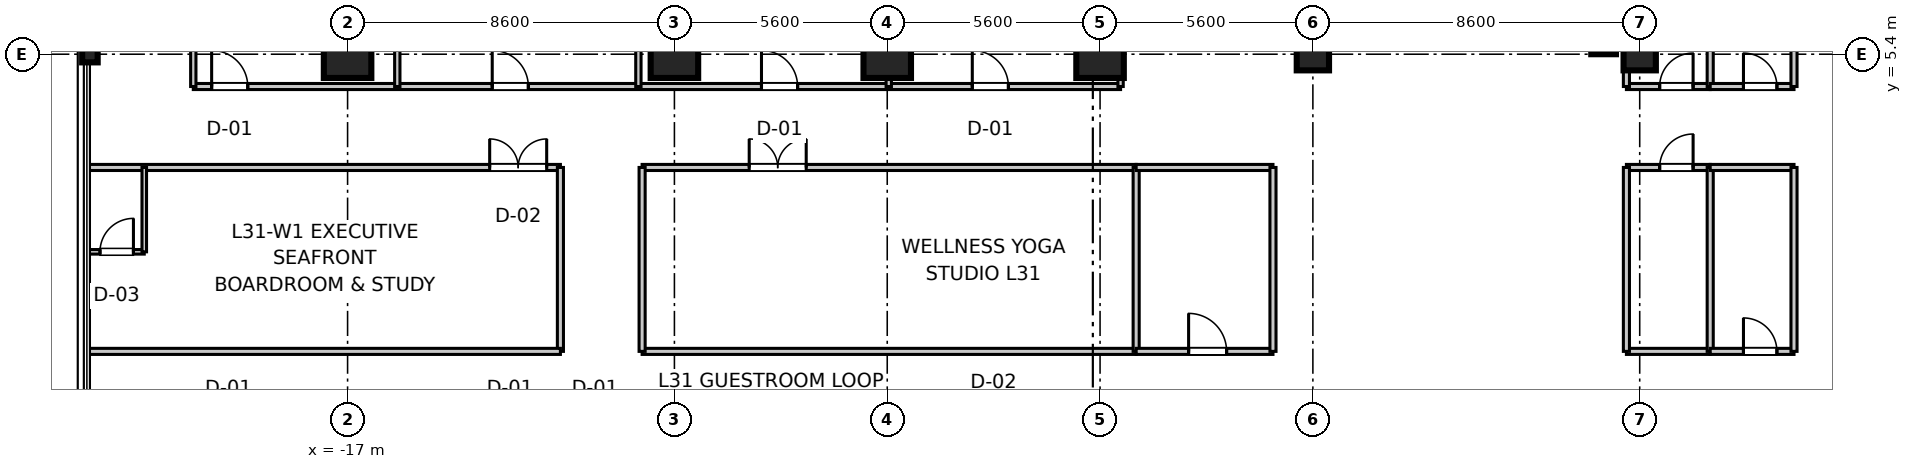
"""IFC4 building model, lengths in metres.
Left out: names, types, materials, properties, quantities, classifications, styles, units other than length and angle.
Written with IfcOpenShell. Run it as: python <this file> out.ifc"""

import sys

from ifc_helpers import new_model, si_unit, direction, frame, frame_2d, origin, origin_2d, place, context, subcontext, project, spatial, rectangle, i_section, extrude, source, transform, mapped, element, fill, save


model = new_model("IFC4")
c1 = context("Model", 3, precision=1e-05, world=origin(), true_north=direction((0.0, 1.0)))
c2 = subcontext(c1, "Body", "Model", "MODEL_VIEW")
j1 = project(units=[si_unit("LENGTHUNIT", "METRE"), si_unit("PLANEANGLEUNIT", "RADIAN")], contexts=[c1])
p1 = place(None, origin())
s1 = spatial("IfcSite", under=j1, at=p1, CompositionType="ELEMENT")
p2 = place(p1, origin())
s2 = spatial("IfcBuilding", under=s1, at=p2, CompositionType="ELEMENT")
p3 = place(p2, frame((0.0, 0.0, 124.8)))
s3 = spatial("IfcBuildingStorey", under=s2, at=p3, CompositionType="ELEMENT", Elevation=124.8)
m1 = source(origin(), c2, "Body", "SweptSolid", [
    extrude(rectangle(XDim=1.25, YDim=1.25, at=origin_2d()), origin(), (0.0, 0.0, 1.0), 3.605),
])
for number, where, z_axis, x_axis in (
    (1, (-17.0, 5.4, 0.0), (0.0, 0.0, 1.0), (1.0, 0.0, 0.0)),
    (2, (-8.4, 5.4, 0.0), (0.0, 0.0, 1.0), (1.0, 0.0, 0.0)),
    (3, (-2.8, 5.4, 0.0), (0.0, 0.0, 1.0), (1.0, 0.0, 0.0)),
    (4, (2.8, 5.4, 0.0), (0.0, 0.0, 1.0), (1.0, 0.0, 0.0)),
):
    element("IfcColumn", number, at=place(p3, frame(where, z_axis=z_axis, x_axis=x_axis)), inside=s3, PredefinedType="COLUMN", context=c2, shape_type="MappedRepresentation", body=[
        mapped(m1, transform((0.0, 0.0, 0.0), scale=1.0)),
    ])
m2 = source(origin(), c2, "Body", "SweptSolid", [
    extrude(rectangle(XDim=0.85, YDim=0.85, at=origin_2d()), origin(), (0.0, 0.0, 1.0), 3.605),
])
for number, where, z_axis, x_axis in (
    (5, (8.4, 5.4, 0.0), (0.0, 0.0, 1.0), (1.0, 0.0, 0.0)),
    (6, (17.0, 5.4, 0.0), (0.0, 0.0, 1.0), (1.0, 0.0, 0.0)),
):
    element("IfcColumn", number, at=place(p3, frame(where, z_axis=z_axis, x_axis=x_axis)), inside=s3, PredefinedType="PILASTER", context=c2, shape_type="MappedRepresentation", body=[
        mapped(m2, transform((0.0, 0.0, 0.0), scale=1.0)),
    ])
m3 = source(origin(), c2, "Body", "SweptSolid", [
    extrude(i_section(OverallWidth=0.409, OverallDepth=0.43, WebThickness=0.021, FlangeThickness=0.034, at=origin_2d()), origin(), (0.0, 0.0, 1.0), 3.605),
])
p4 = place(p3, frame((-23.78, 5.4, 0.0), z_axis=(0.0, 0.0, 1.0), x_axis=(1.0, 0.0, 0.0)))
e7 = element("IfcColumn", 7, at=p4, inside=s3, PredefinedType="COLUMN", context=c2, shape_type="MappedRepresentation", body=[
    mapped(m3, transform((0.0, 0.0, 0.0), scale=1.0)),
])
m4 = source(origin(), c2, "Body", "SweptSolid", [
    extrude(rectangle(XDim=11.6, YDim=0.65, at=frame_2d((5.8, 0.0))), origin(), (0.0, 0.0, 1.0), 3.38),
])
p5 = place(p3, frame((16.05, 5.4, 0.0), z_axis=(0.0, 0.0, 1.0), x_axis=(0.0, 1.0, 0.0)))
e8 = element("IfcWall", 8, at=p5, inside=s3, PredefinedType="SHEAR", context=c2, shape_type="MappedRepresentation", body=[
    mapped(m4, transform((0.0, 0.0, 0.0), scale=1.0)),
])
m5 = source(origin(), c2, "Body", "SweptSolid", [
    extrude(rectangle(XDim=2.205, YDim=0.16, at=frame_2d((1.103, 0.0))), origin(), (0.0, 0.0, 1.0), 2.72),
])
p6 = place(p3, frame((16.65, 4.55, 0.0), z_axis=(0.0, 0.0, 1.0), x_axis=(1.0, 0.0, 0.0)))
e9 = element("IfcWall", 9, at=p6, inside=s3, PredefinedType="PARTITIONING", context=c2, shape_type="MappedRepresentation", body=[
    mapped(m5, transform((0.0, 0.0, 0.0), scale=1.0)),
])
p7 = place(p6, frame((0.875, 0.0, 0.0)))
e10 = element("IfcOpeningElement", 10, at=p7, cuts=e9, PredefinedType="OPENING", context=c2, shape_type="SweptSolid", body=[
    extrude(rectangle(XDim=0.88, YDim=2.1, at=frame_2d((0.44, 1.05))), frame((0.0, 0.09, 0.0), z_axis=(0.0, -1.0, 0.0), x_axis=(1.0, 0.0, 0.0)), (0.0, 0.0, 1.0), 0.18),
])
m6 = source(origin(), c2, "Body", "SweptSolid", [
    extrude(rectangle(XDim=19.25, YDim=0.16, at=frame_2d((9.625, 0.0))), origin(), (0.0, 0.0, 1.0), 2.72),
])
for number, where, z_axis, x_axis in (
    (11, (16.65, 4.55, 0.0), (0.0, 0.0, 1.0), (0.0, 1.0, 0.0)),
    (12, (18.855, 4.55, 0.0), (0.0, 0.0, 1.0), (0.0, 1.0, 0.0)),
):
    element("IfcWall", number, at=place(p3, frame(where, z_axis=z_axis, x_axis=x_axis)), inside=s3, PredefinedType="PARTITIONING", context=c2, shape_type="MappedRepresentation", body=[
        mapped(m6, transform((0.0, 0.0, 0.0), scale=1.0)),
    ])
p8 = place(p3, frame((18.855, 4.55, 0.0), z_axis=(0.0, 0.0, 1.0), x_axis=(1.0, 0.0, 0.0)))
e13 = element("IfcWall", 13, at=p8, inside=s3, PredefinedType="PARTITIONING", context=c2, shape_type="MappedRepresentation", body=[
    mapped(m5, transform((0.0, 0.0, 0.0), scale=1.0)),
])
p9 = place(p8, frame((0.875, 0.0, 0.0)))
e14 = element("IfcOpeningElement", 14, at=p9, cuts=e13, PredefinedType="OPENING", context=c2, shape_type="SweptSolid", body=[
    extrude(rectangle(XDim=0.88, YDim=2.1, at=frame_2d((0.44, 1.05))), frame((0.0, 0.09, 0.0), z_axis=(0.0, -1.0, 0.0), x_axis=(1.0, 0.0, 0.0)), (0.0, 0.0, 1.0), 0.18),
])
m7 = source(origin(), c2, "Body", "SweptSolid", [
    extrude(rectangle(XDim=17.83, YDim=0.16, at=frame_2d((8.915, 0.0))), origin(), (0.0, 0.0, 1.0), 2.72),
])
p10 = place(p3, frame((21.06, 4.55, 0.0), z_axis=(0.0, 0.0, 1.0), x_axis=(0.0, 1.0, 0.0)))
e15 = element("IfcWall", 15, at=p10, inside=s3, PredefinedType="PARTITIONING", context=c2, shape_type="MappedRepresentation", body=[
    mapped(m7, transform((0.0, 0.0, 0.0), scale=1.0)),
])
m8 = source(origin(), c2, "Body", "SweptSolid", [
    extrude(rectangle(XDim=24.4, YDim=0.16, at=frame_2d((12.2, 0.0))), origin(), (0.0, 0.0, 1.0), 2.72),
])
p11 = place(p3, frame((-21.06, 4.55, 0.0), z_axis=(0.0, 0.0, 1.0), x_axis=(1.0, 0.0, 0.0)))
e16 = element("IfcWall", 16, at=p11, inside=s3, PredefinedType="PARTITIONING", context=c2, shape_type="MappedRepresentation", body=[
    mapped(m8, transform((0.0, 0.0, 0.0), scale=1.0)),
])
p12 = place(p11, frame((0.483, 0.0, 0.0)))
e17 = element("IfcOpeningElement", 17, at=p12, cuts=e16, PredefinedType="OPENING", context=c2, shape_type="SweptSolid", body=[
    extrude(rectangle(XDim=0.95, YDim=2.1, at=frame_2d((0.475, 1.05))), frame((0.0, 0.09, 0.0), z_axis=(0.0, -1.0, 0.0), x_axis=(1.0, 0.0, 0.0)), (0.0, 0.0, 1.0), 0.18),
])
p13 = place(p11, frame((7.866, 0.0, 0.0)))
e18 = element("IfcOpeningElement", 18, at=p13, cuts=e16, PredefinedType="OPENING", context=c2, shape_type="SweptSolid", body=[
    extrude(rectangle(XDim=0.95, YDim=2.1, at=frame_2d((0.475, 1.05))), frame((0.0, 0.09, 0.0), z_axis=(0.0, -1.0, 0.0), x_axis=(1.0, 0.0, 0.0)), (0.0, 0.0, 1.0), 0.18),
])
p14 = place(p11, frame((14.951, 0.0, 0.0)))
e19 = element("IfcOpeningElement", 19, at=p14, cuts=e16, PredefinedType="OPENING", context=c2, shape_type="SweptSolid", body=[
    extrude(rectangle(XDim=0.95, YDim=2.1, at=frame_2d((0.475, 1.05))), frame((0.0, 0.09, 0.0), z_axis=(0.0, -1.0, 0.0), x_axis=(1.0, 0.0, 0.0)), (0.0, 0.0, 1.0), 0.18),
])
p15 = place(p11, frame((20.498, 0.0, 0.0)))
e20 = element("IfcOpeningElement", 20, at=p15, cuts=e16, PredefinedType="OPENING", context=c2, shape_type="SweptSolid", body=[
    extrude(rectangle(XDim=0.95, YDim=2.1, at=frame_2d((0.475, 1.05))), frame((0.0, 0.09, 0.0), z_axis=(0.0, -1.0, 0.0), x_axis=(1.0, 0.0, 0.0)), (0.0, 0.0, 1.0), 0.18),
])
m9 = source(origin(), c2, "Body", "SweptSolid", [
    extrude(rectangle(XDim=17.83, YDim=0.14, at=frame_2d((8.915, 0.0))), origin(), (0.0, 0.0, 1.0), 2.72),
])
p16 = place(p3, frame((-21.06, 4.55, 0.0), z_axis=(0.0, 0.0, 1.0), x_axis=(0.0, 1.0, 0.0)))
e21 = element("IfcWall", 21, at=p16, inside=s3, PredefinedType="PARTITIONING", context=c2, shape_type="MappedRepresentation", body=[
    mapped(m9, transform((0.0, 0.0, 0.0), scale=1.0)),
])
m10 = source(origin(), c2, "Body", "SweptSolid", [
    extrude(rectangle(XDim=19.25, YDim=0.14, at=frame_2d((9.625, 0.0))), origin(), (0.0, 0.0, 1.0), 2.72),
])
for number, where, z_axis, x_axis in (
    (22, (3.34, 4.55, 0.0), (0.0, 0.0, 1.0), (0.0, 1.0, 0.0)),
    (23, (-15.692, 4.55, 0.0), (0.0, 0.0, 1.0), (0.0, 1.0, 0.0)),
    (24, (-9.348, 4.55, 0.0), (0.0, 0.0, 1.0), (0.0, 1.0, 0.0)),
    (25, (-2.76, 4.55, 0.0), (0.0, 0.0, 1.0), (0.0, 1.0, 0.0)),
):
    element("IfcWall", number, at=place(p3, frame(where, z_axis=z_axis, x_axis=x_axis)), inside=s3, PredefinedType="PARTITIONING", context=c2, shape_type="MappedRepresentation", body=[
        mapped(m10, transform((0.0, 0.0, 0.0), scale=1.0)),
    ])
m11 = source(origin(), c2, "Body", "SweptSolid", [
    extrude(rectangle(XDim=12.4, YDim=0.16, at=frame_2d((6.2, 0.0))), origin(), (0.0, 0.0, 1.0), 2.72),
])
p17 = place(p3, frame((-23.8, 2.42, 0.0), z_axis=(0.0, 0.0, 1.0), x_axis=(1.0, 0.0, 0.0)))
e26 = element("IfcWall", 26, at=p17, inside=s3, PredefinedType="PARTITIONING", context=c2, shape_type="MappedRepresentation", body=[
    mapped(m11, transform((0.0, 0.0, 0.0), scale=1.0)),
])
p18 = place(p17, frame((10.539, 0.0, 0.0)))
e27 = element("IfcOpeningElement", 27, at=p18, cuts=e26, PredefinedType="OPENING", context=c2, shape_type="SweptSolid", body=[
    extrude(rectangle(XDim=1.5, YDim=2.15, at=frame_2d((0.75, 1.075))), frame((0.0, 0.09, 0.0), z_axis=(0.0, -1.0, 0.0), x_axis=(1.0, 0.0, 0.0)), (0.0, 0.0, 1.0), 0.18),
])
m12 = source(origin(), c2, "Body", "SweptSolid", [
    extrude(rectangle(XDim=4.84, YDim=0.16, at=frame_2d((2.42, 0.0))), origin(), (0.0, 0.0, 1.0), 2.72),
])
p19 = place(p3, frame((-11.4, -2.42, 0.0), z_axis=(0.0, 0.0, 1.0), x_axis=(0.0, 1.0, 0.0)))
e28 = element("IfcWall", 28, at=p19, inside=s3, PredefinedType="PARTITIONING", context=c2, shape_type="MappedRepresentation", body=[
    mapped(m12, transform((0.0, 0.0, 0.0), scale=1.0)),
])
p20 = place(p3, frame((-23.8, -2.42, 0.0), z_axis=(0.0, 0.0, 1.0), x_axis=(1.0, 0.0, 0.0)))
e29 = element("IfcWall", 29, at=p20, inside=s3, PredefinedType="PARTITIONING", context=c2, shape_type="MappedRepresentation", body=[
    mapped(m11, transform((0.0, 0.0, 0.0), scale=1.0)),
])
m13 = source(origin(), c2, "Body", "SweptSolid", [
    extrude(rectangle(XDim=1.45, YDim=0.12, at=frame_2d((0.725, 0.0))), origin(), (0.0, 0.0, 1.0), 2.72),
])
p21 = place(p3, frame((-23.8, 0.2, 0.0), z_axis=(0.0, 0.0, 1.0), x_axis=(1.0, 0.0, 0.0)))
e30 = element("IfcWall", 30, at=p21, inside=s3, PredefinedType="PARTITIONING", context=c2, shape_type="MappedRepresentation", body=[
    mapped(m13, transform((0.0, 0.0, 0.0), scale=1.0)),
])
p22 = place(p21, frame((0.285, 0.0, 0.0)))
e31 = element("IfcOpeningElement", 31, at=p22, cuts=e30, PredefinedType="OPENING", context=c2, shape_type="SweptSolid", body=[
    extrude(rectangle(XDim=0.88, YDim=2.1, at=frame_2d((0.44, 1.05))), frame((0.0, 0.07, 0.0), z_axis=(0.0, -1.0, 0.0), x_axis=(1.0, 0.0, 0.0)), (0.0, 0.0, 1.0), 0.14),
])
m14 = source(origin(), c2, "Body", "SweptSolid", [
    extrude(rectangle(XDim=2.22, YDim=0.12, at=frame_2d((1.11, 0.0))), origin(), (0.0, 0.0, 1.0), 2.72),
])
p23 = place(p3, frame((-22.35, 0.2, 0.0), z_axis=(0.0, 0.0, 1.0), x_axis=(0.0, 1.0, 0.0)))
e32 = element("IfcWall", 32, at=p23, inside=s3, PredefinedType="PARTITIONING", context=c2, shape_type="MappedRepresentation", body=[
    mapped(m14, transform((0.0, 0.0, 0.0), scale=1.0)),
])
m15 = source(origin(), c2, "Body", "SweptSolid", [
    extrude(rectangle(XDim=13.0, YDim=0.16, at=frame_2d((6.5, 0.0))), origin(), (0.0, 0.0, 1.0), 2.72),
])
p24 = place(p3, frame((-9.25, -2.42, 0.0), z_axis=(0.0, 0.0, 1.0), x_axis=(1.0, 0.0, 0.0)))
e33 = element("IfcWall", 33, at=p24, inside=s3, PredefinedType="PARTITIONING", context=c2, shape_type="MappedRepresentation", body=[
    mapped(m15, transform((0.0, 0.0, 0.0), scale=1.0)),
])
p25 = place(p3, frame((-9.25, 2.42, 0.0), z_axis=(0.0, 0.0, 1.0), x_axis=(1.0, 0.0, 0.0)))
e34 = element("IfcWall", 34, at=p25, inside=s3, PredefinedType="PARTITIONING", context=c2, shape_type="MappedRepresentation", body=[
    mapped(m15, transform((0.0, 0.0, 0.0), scale=1.0)),
])
p26 = place(p25, frame((2.818, 0.0, 0.0)))
e35 = element("IfcOpeningElement", 35, at=p26, cuts=e34, PredefinedType="OPENING", context=c2, shape_type="SweptSolid", body=[
    extrude(rectangle(XDim=1.5, YDim=2.15, at=frame_2d((0.75, 1.075))), frame((0.0, 0.09, 0.0), z_axis=(0.0, -1.0, 0.0), x_axis=(1.0, 0.0, 0.0)), (0.0, 0.0, 1.0), 0.18),
])
for number, where, z_axis, x_axis in (
    (36, (-9.25, -2.42, 0.0), (0.0, 0.0, 1.0), (0.0, 1.0, 0.0)),
    (37, (3.75, -2.42, 0.0), (0.0, 0.0, 1.0), (0.0, 1.0, 0.0)),
):
    element("IfcWall", number, at=place(p3, frame(where, z_axis=z_axis, x_axis=x_axis)), inside=s3, PredefinedType="PARTITIONING", context=c2, shape_type="MappedRepresentation", body=[
        mapped(m12, transform((0.0, 0.0, 0.0), scale=1.0)),
    ])
m16 = source(origin(), c2, "Body", "SweptSolid", [
    extrude(rectangle(XDim=3.6, YDim=0.16, at=frame_2d((1.8, 0.0))), origin(), (0.0, 0.0, 1.0), 2.72),
])
p27 = place(p3, frame((3.75, -2.42, 0.0), z_axis=(0.0, 0.0, 1.0), x_axis=(1.0, 0.0, 0.0)))
e38 = element("IfcWall", 38, at=p27, inside=s3, PredefinedType="PARTITIONING", context=c2, shape_type="MappedRepresentation", body=[
    mapped(m16, transform((0.0, 0.0, 0.0), scale=1.0)),
])
p28 = place(p27, frame((1.38, 0.0, 0.0)))
e39 = element("IfcOpeningElement", 39, at=p28, cuts=e38, PredefinedType="OPENING", context=c2, shape_type="SweptSolid", body=[
    extrude(rectangle(XDim=1.0, YDim=2.1, at=frame_2d((0.5, 1.05))), frame((0.0, 0.09, 0.0), z_axis=(0.0, -1.0, 0.0), x_axis=(1.0, 0.0, 0.0)), (0.0, 0.0, 1.0), 0.18),
])
p29 = place(p3, frame((3.75, 2.42, 0.0), z_axis=(0.0, 0.0, 1.0), x_axis=(1.0, 0.0, 0.0)))
e40 = element("IfcWall", 40, at=p29, inside=s3, PredefinedType="PARTITIONING", context=c2, shape_type="MappedRepresentation", body=[
    mapped(m16, transform((0.0, 0.0, 0.0), scale=1.0)),
])
p30 = place(p3, frame((7.35, -2.42, 0.0), z_axis=(0.0, 0.0, 1.0), x_axis=(0.0, 1.0, 0.0)))
e41 = element("IfcWall", 41, at=p30, inside=s3, PredefinedType="PARTITIONING", context=c2, shape_type="MappedRepresentation", body=[
    mapped(m12, transform((0.0, 0.0, 0.0), scale=1.0)),
])
p31 = place(p3, frame((16.65, -2.42, 0.0), z_axis=(0.0, 0.0, 1.0), x_axis=(1.0, 0.0, 0.0)))
e42 = element("IfcWall", 42, at=p31, inside=s3, PredefinedType="PARTITIONING", context=c2, shape_type="MappedRepresentation", body=[
    mapped(m5, transform((0.0, 0.0, 0.0), scale=1.0)),
])
p32 = place(p3, frame((16.65, 2.42, 0.0), z_axis=(0.0, 0.0, 1.0), x_axis=(1.0, 0.0, 0.0)))
e43 = element("IfcWall", 43, at=p32, inside=s3, PredefinedType="PARTITIONING", context=c2, shape_type="MappedRepresentation", body=[
    mapped(m5, transform((0.0, 0.0, 0.0), scale=1.0)),
])
p33 = place(p32, frame((0.875, 0.0, 0.0)))
e44 = element("IfcOpeningElement", 44, at=p33, cuts=e43, PredefinedType="OPENING", context=c2, shape_type="SweptSolid", body=[
    extrude(rectangle(XDim=0.88, YDim=2.1, at=frame_2d((0.44, 1.05))), frame((0.0, 0.09, 0.0), z_axis=(0.0, -1.0, 0.0), x_axis=(1.0, 0.0, 0.0)), (0.0, 0.0, 1.0), 0.18),
])
for number, where, z_axis, x_axis in (
    (45, (16.65, -2.42, 0.0), (0.0, 0.0, 1.0), (0.0, 1.0, 0.0)),
    (46, (18.855, -2.42, 0.0), (0.0, 0.0, 1.0), (0.0, 1.0, 0.0)),
):
    element("IfcWall", number, at=place(p3, frame(where, z_axis=z_axis, x_axis=x_axis)), inside=s3, PredefinedType="PARTITIONING", context=c2, shape_type="MappedRepresentation", body=[
        mapped(m12, transform((0.0, 0.0, 0.0), scale=1.0)),
    ])
p34 = place(p3, frame((18.855, -2.42, 0.0), z_axis=(0.0, 0.0, 1.0), x_axis=(1.0, 0.0, 0.0)))
e47 = element("IfcWall", 47, at=p34, inside=s3, PredefinedType="PARTITIONING", context=c2, shape_type="MappedRepresentation", body=[
    mapped(m5, transform((0.0, 0.0, 0.0), scale=1.0)),
])
p35 = place(p34, frame((0.875, 0.0, 0.0)))
e48 = element("IfcOpeningElement", 48, at=p35, cuts=e47, PredefinedType="OPENING", context=c2, shape_type="SweptSolid", body=[
    extrude(rectangle(XDim=0.88, YDim=2.1, at=frame_2d((0.44, 1.05))), frame((0.0, 0.09, 0.0), z_axis=(0.0, -1.0, 0.0), x_axis=(1.0, 0.0, 0.0)), (0.0, 0.0, 1.0), 0.18),
])
p36 = place(p3, frame((18.855, 2.42, 0.0), z_axis=(0.0, 0.0, 1.0), x_axis=(1.0, 0.0, 0.0)))
e49 = element("IfcWall", 49, at=p36, inside=s3, PredefinedType="PARTITIONING", context=c2, shape_type="MappedRepresentation", body=[
    mapped(m5, transform((0.0, 0.0, 0.0), scale=1.0)),
])
p37 = place(p3, frame((21.06, -2.42, 0.0), z_axis=(0.0, 0.0, 1.0), x_axis=(0.0, 1.0, 0.0)))
e50 = element("IfcWall", 50, at=p37, inside=s3, PredefinedType="PARTITIONING", context=c2, shape_type="MappedRepresentation", body=[
    mapped(m12, transform((0.0, 0.0, 0.0), scale=1.0)),
])
m17 = source(origin(), c2, "Body", "SweptSolid", [
    extrude(rectangle(XDim=0.88, YDim=2.1, at=frame_2d((0.44, 1.05))), frame((0.0, 0.025, 0.0), z_axis=(0.0, -1.0, 0.0), x_axis=(1.0, 0.0, 0.0)), (0.0, 0.0, 1.0), 0.05),
])
p38 = place(p7, origin())
e51 = element("IfcDoor", 51, at=p38, inside=s3, OperationType="SINGLE_SWING_RIGHT", PredefinedType="DOOR", context=c2, shape_type="MappedRepresentation", body=[
    mapped(m17, transform((0.0, 0.0, 0.0), scale=1.0)),
])
fill(e10, e51)
p39 = place(p9, origin())
e52 = element("IfcDoor", 52, at=p39, inside=s3, OperationType="SINGLE_SWING_LEFT", PredefinedType="DOOR", context=c2, shape_type="MappedRepresentation", body=[
    mapped(m17, transform((0.0, 0.0, 0.0), scale=1.0)),
])
fill(e14, e52)
m18 = source(origin(), c2, "Body", "SweptSolid", [
    extrude(rectangle(XDim=0.95, YDim=2.1, at=frame_2d((0.475, 1.05))), frame((0.0, 0.025, 0.0), z_axis=(0.0, -1.0, 0.0), x_axis=(1.0, 0.0, 0.0)), (0.0, 0.0, 1.0), 0.05),
])
p40 = place(p12, origin())
e53 = element("IfcDoor", 53, at=p40, inside=s3, OperationType="SINGLE_SWING_LEFT", PredefinedType="DOOR", context=c2, shape_type="MappedRepresentation", body=[
    mapped(m18, transform((0.0, 0.0, 0.0), scale=1.0)),
])
fill(e17, e53)
p41 = place(p13, origin())
e54 = element("IfcDoor", 54, at=p41, inside=s3, OperationType="SINGLE_SWING_LEFT", PredefinedType="DOOR", context=c2, shape_type="MappedRepresentation", body=[
    mapped(m18, transform((0.0, 0.0, 0.0), scale=1.0)),
])
fill(e18, e54)
p42 = place(p14, origin())
e55 = element("IfcDoor", 55, at=p42, inside=s3, OperationType="SINGLE_SWING_LEFT", PredefinedType="DOOR", context=c2, shape_type="MappedRepresentation", body=[
    mapped(m18, transform((0.0, 0.0, 0.0), scale=1.0)),
])
fill(e19, e55)
p43 = place(p15, origin())
e56 = element("IfcDoor", 56, at=p43, inside=s3, OperationType="SINGLE_SWING_LEFT", PredefinedType="DOOR", context=c2, shape_type="MappedRepresentation", body=[
    mapped(m18, transform((0.0, 0.0, 0.0), scale=1.0)),
])
fill(e20, e56)
p44 = place(p22, origin())
e57 = element("IfcDoor", 57, at=p44, inside=s3, OperationType="SINGLE_SWING_RIGHT", PredefinedType="DOOR", context=c2, shape_type="MappedRepresentation", body=[
    mapped(m17, transform((0.0, 0.0, 0.0), scale=1.0)),
])
fill(e31, e57)
m19 = source(origin(), c2, "Body", "SweptSolid", [
    extrude(rectangle(XDim=1.5, YDim=2.15, at=frame_2d((0.75, 1.075))), frame((0.0, 0.025, 0.0), z_axis=(0.0, -1.0, 0.0), x_axis=(1.0, 0.0, 0.0)), (0.0, 0.0, 1.0), 0.05),
])
p45 = place(p18, origin())
e58 = element("IfcDoor", 58, at=p45, inside=s3, OperationType="DOUBLE_DOOR_SINGLE_SWING", PredefinedType="DOOR", context=c2, shape_type="MappedRepresentation", body=[
    mapped(m19, transform((0.0, 0.0, 0.0), scale=1.0)),
])
fill(e27, e58)
p46 = place(p26, frame((1.5, 0.0, 0.0), z_axis=(0.0, 0.0, 1.0), x_axis=(-1.0, 0.0, 0.0)))
e59 = element("IfcDoor", 59, at=p46, inside=s3, OperationType="DOUBLE_DOOR_SINGLE_SWING", PredefinedType="DOOR", context=c2, shape_type="MappedRepresentation", body=[
    mapped(m19, transform((0.0, 0.0, 0.0), scale=1.0)),
])
fill(e35, e59)
m20 = source(origin(), c2, "Body", "SweptSolid", [
    extrude(rectangle(XDim=1.0, YDim=2.1, at=frame_2d((0.5, 1.05))), frame((0.0, 0.025, 0.0), z_axis=(0.0, -1.0, 0.0), x_axis=(1.0, 0.0, 0.0)), (0.0, 0.0, 1.0), 0.05),
])
p47 = place(p28, origin())
e60 = element("IfcDoor", 60, at=p47, inside=s3, OperationType="SINGLE_SWING_LEFT", PredefinedType="DOOR", context=c2, shape_type="MappedRepresentation", body=[
    mapped(m20, transform((0.0, 0.0, 0.0), scale=1.0)),
])
fill(e39, e60)
p48 = place(p33, frame((0.88, 0.0, 0.0), z_axis=(0.0, 0.0, 1.0), x_axis=(-1.0, 0.0, 0.0)))
e61 = element("IfcDoor", 61, at=p48, inside=s3, OperationType="SINGLE_SWING_RIGHT", PredefinedType="DOOR", context=c2, shape_type="MappedRepresentation", body=[
    mapped(m17, transform((0.0, 0.0, 0.0), scale=1.0)),
])
fill(e44, e61)
p49 = place(p35, origin())
e62 = element("IfcDoor", 62, at=p49, inside=s3, OperationType="SINGLE_SWING_LEFT", PredefinedType="DOOR", context=c2, shape_type="MappedRepresentation", body=[
    mapped(m17, transform((0.0, 0.0, 0.0), scale=1.0)),
])
fill(e48, e62)
save(model, sys.argv[1])
